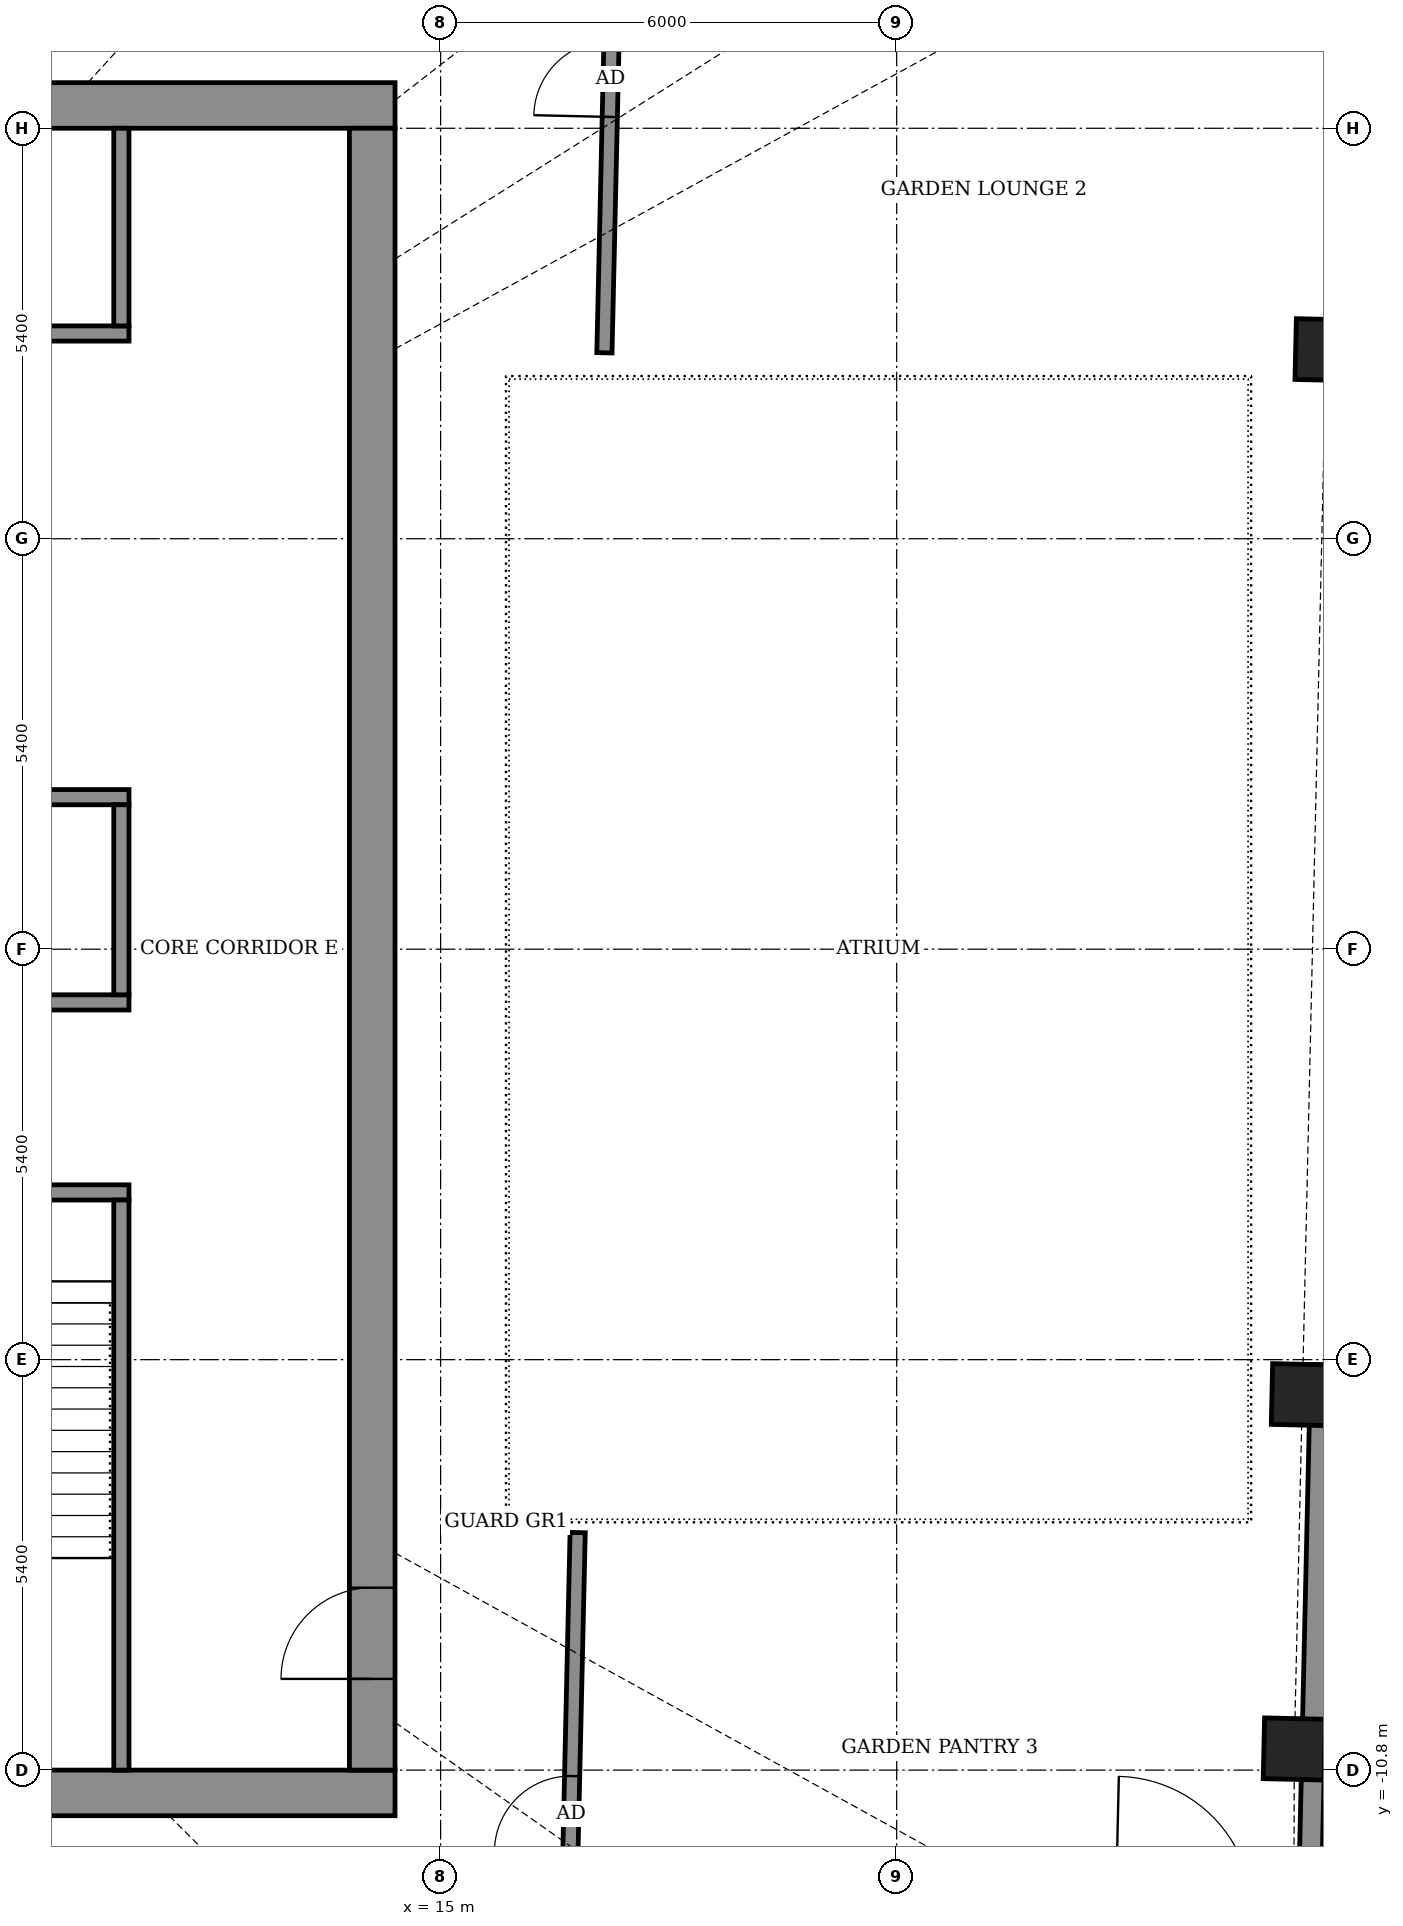
"""IFC4 building model, lengths in metres.
Left out: names, types, materials, properties, quantities, classifications, styles, units other than length and angle.
Written with IfcOpenShell. Run it as: python <this file> out.ifc"""

import sys

from ifc_helpers import new_model, si_unit, direction, frame, frame_2d, origin, origin_2d, place, context, subcontext, project, spatial, rectangle, extrude, element, fill, save


model = new_model("IFC4")
c1 = context("Model", 3, precision=1e-05, world=origin(), true_north=direction((0.0, 1.0)))
c2 = subcontext(c1, "Body", "Model", "MODEL_VIEW")
j1 = project(units=[si_unit("LENGTHUNIT", "METRE"), si_unit("PLANEANGLEUNIT", "RADIAN")], contexts=[c1])
p1 = place(None, origin())
s1 = spatial("IfcSite", under=j1, at=p1, CompositionType="ELEMENT")
p2 = place(p1, origin())
s2 = spatial("IfcBuilding", under=s1, at=p2, CompositionType="ELEMENT")
p3 = place(p2, frame((0.0, 0.0, 346.1)))
s3 = spatial("IfcBuildingStorey", under=s2, at=p3, CompositionType="ELEMENT", Elevation=346.1)
for number, where, z_axis, x_axis in (
    (1, (26.231, -10.522, -0.55), (0.0, 0.0, 1.0), (0.023, 1.0, 0.0)),
    (2, (26.337, -5.861, -0.55), (0.0, 0.0, 1.0), (0.023, 1.0, 0.0)),
    (3, (26.649, 7.886, -0.55), (0.0, 0.0, 1.0), (0.023, 1.0, 0.0)),
):
    element("IfcColumn", number, at=place(p3, frame(where, z_axis=z_axis, x_axis=x_axis)), inside=s3, PredefinedType="COLUMN", context=c2, shape_type="SweptSolid", body=[
        extrude(rectangle(XDim=0.8, YDim=0.8, at=origin_2d()), origin(), (0.0, 0.0, 1.0), 4.6),
    ])
p4 = place(p3, frame((26.431, -12.74, 0.0), z_axis=(0.0, 0.0, 1.0), x_axis=(0.022686338341, 0.999742631907, 0.0)))
e4 = element("IfcWall", 4, at=p4, inside=s3, PredefinedType="SOLIDWALL", context=c2, shape_type="SweptSolid", body=[
    extrude(rectangle(XDim=7.275, YDim=0.3, at=frame_2d((3.637, 0.0))), origin(), (0.0, 0.0, 1.0), 2.75),
])
p5 = place(p3, frame((16.684, -12.919, 0.0), z_axis=(0.0, 0.0, 1.0), x_axis=(0.022667483124, 0.999743059595, 0.0)))
e5 = element("IfcWall", 5, at=p5, inside=s3, PredefinedType="PARTITIONING", context=c2, shape_type="SweptSolid", body=[
    extrude(rectangle(XDim=5.245, YDim=0.2, at=frame_2d((2.623, 0.0))), origin(), (0.0, 0.0, 1.0), 2.65),
])
p6 = place(p5, frame((1.041, 0.0, 0.0)))
e6 = element("IfcOpeningElement", 6, at=p6, cuts=e5, PredefinedType="OPENING", context=c2, shape_type="SweptSolid", body=[
    extrude(rectangle(XDim=1.0, YDim=2.1, at=frame_2d((0.5, 1.05))), frame((0.0, 0.11, 0.0), z_axis=(0.0, -1.0, 0.0), x_axis=(1.0, 0.0, 0.0)), (0.0, 0.0, 1.0), 0.22),
])
p7 = place(p3, frame((17.155, 7.846, 0.0), z_axis=(0.0, 0.0, 1.0), x_axis=(0.022745886685, 0.999741278851, 0.0)))
e7 = element("IfcWall", 7, at=p7, inside=s3, PredefinedType="PARTITIONING", context=c2, shape_type="SweptSolid", body=[
    extrude(rectangle(XDim=4.304, YDim=0.2, at=frame_2d((2.152, 0.0))), origin(), (0.0, 0.0, 1.0), 2.55),
])
p8 = place(p7, frame((3.104, 0.0, 0.0)))
e8 = element("IfcOpeningElement", 8, at=p8, cuts=e7, PredefinedType="OPENING", context=c2, shape_type="SweptSolid", body=[
    extrude(rectangle(XDim=1.0, YDim=2.1, at=frame_2d((0.5, 1.05))), frame((0.0, 0.11, 0.0), z_axis=(0.0, -1.0, 0.0), x_axis=(1.0, 0.0, 0.0)), (0.0, 0.0, 1.0), 0.22),
])
for number, where, z_axis, x_axis in (
    (9, (-14.4, -11.1, 0.0), (0.0, 0.0, 1.0), (1.0, 0.0, 0.0)),
    (10, (-14.4, 11.1, 0.0), (0.0, 0.0, 1.0), (1.0, 0.0, 0.0)),
):
    element("IfcWall", number, at=place(p3, frame(where, z_axis=z_axis, x_axis=x_axis)), inside=s3, PredefinedType="SHEAR", context=c2, shape_type="SweptSolid", body=[
        extrude(rectangle(XDim=28.8, YDim=0.6, at=frame_2d((14.4, 0.0))), origin(), (0.0, 0.0, 1.0), 4.6),
    ])
p9 = place(p3, frame((14.1, -10.8, 0.0), z_axis=(0.0, 0.0, 1.0), x_axis=(0.0, 1.0, 0.0)))
e11 = element("IfcWall", 11, at=p9, inside=s3, PredefinedType="SHEAR", context=c2, shape_type="SweptSolid", body=[
    extrude(rectangle(XDim=21.6, YDim=0.6, at=frame_2d((10.8, 0.0))), origin(), (0.0, 0.0, 1.0), 4.6),
])
p10 = place(p9, frame((1.2, 0.0, 0.0)))
e12 = element("IfcOpeningElement", 12, at=p10, cuts=e11, PredefinedType="OPENING", context=c2, shape_type="SweptSolid", body=[
    extrude(rectangle(XDim=1.2, YDim=2.1, at=frame_2d((0.6, 1.05))), frame((0.0, 0.31, 0.0), z_axis=(0.0, -1.0, 0.0), x_axis=(1.0, 0.0, 0.0)), (0.0, 0.0, 1.0), 0.62),
])
p11 = place(p3, frame((-10.9, -3.2, 0.0), z_axis=(0.0, 0.0, 1.0), x_axis=(1.0, 0.0, 0.0)))
e13 = element("IfcWall", 13, at=p11, inside=s3, PredefinedType="SHEAR", context=c2, shape_type="SweptSolid", body=[
    extrude(rectangle(XDim=21.8, YDim=0.2, at=frame_2d((10.9, 0.0))), origin(), (0.0, 0.0, 1.0), 4.05),
])
p12 = place(p11, frame((1.075, 0.0, 0.0)))
e14 = element("IfcOpeningElement", 14, at=p12, cuts=e13, PredefinedType="OPENING", context=c2, shape_type="SweptSolid", body=[
    extrude(rectangle(XDim=1.1, YDim=2.1, at=frame_2d((0.55, 1.05))), frame((0.0, 0.11, 0.0), z_axis=(0.0, -1.0, 0.0), x_axis=(1.0, 0.0, 0.0)), (0.0, 0.0, 1.0), 0.22),
])
p13 = place(p11, frame((10.325, 0.0, 0.0)))
e15 = element("IfcOpeningElement", 15, at=p13, cuts=e13, PredefinedType="OPENING", context=c2, shape_type="SweptSolid", body=[
    extrude(rectangle(XDim=1.1, YDim=2.1, at=frame_2d((0.55, 1.05))), frame((0.0, 0.11, 0.0), z_axis=(0.0, -1.0, 0.0), x_axis=(1.0, 0.0, 0.0)), (0.0, 0.0, 1.0), 0.22),
])
p14 = place(p11, frame((19.625, 0.0, 0.0)))
e16 = element("IfcOpeningElement", 16, at=p14, cuts=e13, PredefinedType="OPENING", context=c2, shape_type="SweptSolid", body=[
    extrude(rectangle(XDim=1.1, YDim=2.1, at=frame_2d((0.55, 1.05))), frame((0.0, 0.11, 0.0), z_axis=(0.0, -1.0, 0.0), x_axis=(1.0, 0.0, 0.0)), (0.0, 0.0, 1.0), 0.22),
])
p15 = place(p11, frame((5.7, 0.0, 0.0)))
e17 = element("IfcOpeningElement", 17, at=p15, cuts=e13, PredefinedType="OPENING", context=c2, shape_type="SweptSolid", body=[
    extrude(rectangle(XDim=1.1, YDim=2.1, at=frame_2d((0.55, 1.05))), frame((0.0, 0.11, 0.0), z_axis=(0.0, -1.0, 0.0), x_axis=(1.0, 0.0, 0.0)), (0.0, 0.0, 1.0), 0.22),
])
p16 = place(p11, frame((14.975, 0.0, 0.0)))
e18 = element("IfcOpeningElement", 18, at=p16, cuts=e13, PredefinedType="OPENING", context=c2, shape_type="SweptSolid", body=[
    extrude(rectangle(XDim=1.1, YDim=2.1, at=frame_2d((0.55, 1.05))), frame((0.0, 0.11, 0.0), z_axis=(0.0, -1.0, 0.0), x_axis=(1.0, 0.0, 0.0)), (0.0, 0.0, 1.0), 0.22),
])
p17 = place(p3, frame((-10.9, -0.7, 0.0), z_axis=(0.0, 0.0, 1.0), x_axis=(1.0, 0.0, 0.0)))
e19 = element("IfcWall", 19, at=p17, inside=s3, PredefinedType="SHEAR", context=c2, shape_type="SweptSolid", body=[
    extrude(rectangle(XDim=21.8, YDim=0.2, at=frame_2d((10.9, 0.0))), origin(), (0.0, 0.0, 1.0), 4.05),
])
p18 = place(p3, frame((-10.9, 2.0, 0.0), z_axis=(0.0, 0.0, 1.0), x_axis=(1.0, 0.0, 0.0)))
e20 = element("IfcWall", 20, at=p18, inside=s3, PredefinedType="SHEAR", context=c2, shape_type="SweptSolid", body=[
    extrude(rectangle(XDim=21.8, YDim=0.2, at=frame_2d((10.9, 0.0))), origin(), (0.0, 0.0, 1.0), 4.05),
])
p19 = place(p18, frame((4.95, 0.0, 0.0)))
e21 = element("IfcOpeningElement", 21, at=p19, cuts=e20, PredefinedType="OPENING", context=c2, shape_type="SweptSolid", body=[
    extrude(rectangle(XDim=1.1, YDim=2.1, at=frame_2d((0.55, 1.05))), frame((0.0, 0.11, 0.0), z_axis=(0.0, -1.0, 0.0), x_axis=(1.0, 0.0, 0.0)), (0.0, 0.0, 1.0), 0.22),
])
p20 = place(p18, frame((7.65, 0.0, 0.0)))
e22 = element("IfcOpeningElement", 22, at=p20, cuts=e20, PredefinedType="OPENING", context=c2, shape_type="SweptSolid", body=[
    extrude(rectangle(XDim=1.1, YDim=2.1, at=frame_2d((0.55, 1.05))), frame((0.0, 0.11, 0.0), z_axis=(0.0, -1.0, 0.0), x_axis=(1.0, 0.0, 0.0)), (0.0, 0.0, 1.0), 0.22),
])
p21 = place(p18, frame((10.35, 0.0, 0.0)))
e23 = element("IfcOpeningElement", 23, at=p21, cuts=e20, PredefinedType="OPENING", context=c2, shape_type="SweptSolid", body=[
    extrude(rectangle(XDim=1.1, YDim=2.1, at=frame_2d((0.55, 1.05))), frame((0.0, 0.11, 0.0), z_axis=(0.0, -1.0, 0.0), x_axis=(1.0, 0.0, 0.0)), (0.0, 0.0, 1.0), 0.22),
])
p22 = place(p18, frame((1.675, 0.0, 0.0)))
e24 = element("IfcOpeningElement", 24, at=p22, cuts=e20, PredefinedType="OPENING", context=c2, shape_type="SweptSolid", body=[
    extrude(rectangle(XDim=0.9, YDim=2.1, at=frame_2d((0.45, 1.05))), frame((0.0, 0.11, 0.0), z_axis=(0.0, -1.0, 0.0), x_axis=(1.0, 0.0, 0.0)), (0.0, 0.0, 1.0), 0.22),
])
p23 = place(p18, frame((13.825, 0.0, 0.0)))
e25 = element("IfcOpeningElement", 25, at=p23, cuts=e20, PredefinedType="OPENING", context=c2, shape_type="SweptSolid", body=[
    extrude(rectangle(XDim=0.9, YDim=2.1, at=frame_2d((0.45, 1.05))), frame((0.0, 0.11, 0.0), z_axis=(0.0, -1.0, 0.0), x_axis=(1.0, 0.0, 0.0)), (0.0, 0.0, 1.0), 0.22),
])
p24 = place(p18, frame((18.55, 0.0, 0.0)))
e26 = element("IfcOpeningElement", 26, at=p24, cuts=e20, PredefinedType="OPENING", context=c2, shape_type="SweptSolid", body=[
    extrude(rectangle(XDim=0.9, YDim=2.1, at=frame_2d((0.45, 1.05))), frame((0.0, 0.11, 0.0), z_axis=(0.0, -1.0, 0.0), x_axis=(1.0, 0.0, 0.0)), (0.0, 0.0, 1.0), 0.22),
])
p25 = place(p3, frame((-10.9, 8.1, 0.0), z_axis=(0.0, 0.0, 1.0), x_axis=(1.0, 0.0, 0.0)))
e27 = element("IfcWall", 27, at=p25, inside=s3, PredefinedType="SHEAR", context=c2, shape_type="SweptSolid", body=[
    extrude(rectangle(XDim=21.8, YDim=0.2, at=frame_2d((10.9, 0.0))), origin(), (0.0, 0.0, 1.0), 4.05),
])
p26 = place(p25, frame((4.95, 0.0, 0.0)))
e28 = element("IfcOpeningElement", 28, at=p26, cuts=e27, PredefinedType="OPENING", context=c2, shape_type="SweptSolid", body=[
    extrude(rectangle(XDim=1.1, YDim=2.1, at=frame_2d((0.55, 1.05))), frame((0.0, 0.11, 0.0), z_axis=(0.0, -1.0, 0.0), x_axis=(1.0, 0.0, 0.0)), (0.0, 0.0, 1.0), 0.22),
])
p27 = place(p25, frame((7.65, 0.0, 0.0)))
e29 = element("IfcOpeningElement", 29, at=p27, cuts=e27, PredefinedType="OPENING", context=c2, shape_type="SweptSolid", body=[
    extrude(rectangle(XDim=1.1, YDim=2.1, at=frame_2d((0.55, 1.05))), frame((0.0, 0.11, 0.0), z_axis=(0.0, -1.0, 0.0), x_axis=(1.0, 0.0, 0.0)), (0.0, 0.0, 1.0), 0.22),
])
p28 = place(p25, frame((10.35, 0.0, 0.0)))
e30 = element("IfcOpeningElement", 30, at=p28, cuts=e27, PredefinedType="OPENING", context=c2, shape_type="SweptSolid", body=[
    extrude(rectangle(XDim=1.1, YDim=2.1, at=frame_2d((0.55, 1.05))), frame((0.0, 0.11, 0.0), z_axis=(0.0, -1.0, 0.0), x_axis=(1.0, 0.0, 0.0)), (0.0, 0.0, 1.0), 0.22),
])
p29 = place(p25, frame((1.675, 0.0, 0.0)))
e31 = element("IfcOpeningElement", 31, at=p29, cuts=e27, PredefinedType="OPENING", context=c2, shape_type="SweptSolid", body=[
    extrude(rectangle(XDim=0.9, YDim=2.1, at=frame_2d((0.45, 1.05))), frame((0.0, 0.11, 0.0), z_axis=(0.0, -1.0, 0.0), x_axis=(1.0, 0.0, 0.0)), (0.0, 0.0, 1.0), 0.22),
])
p30 = place(p25, frame((13.825, 0.0, 0.0)))
e32 = element("IfcOpeningElement", 32, at=p30, cuts=e27, PredefinedType="OPENING", context=c2, shape_type="SweptSolid", body=[
    extrude(rectangle(XDim=0.9, YDim=2.1, at=frame_2d((0.45, 1.05))), frame((0.0, 0.11, 0.0), z_axis=(0.0, -1.0, 0.0), x_axis=(1.0, 0.0, 0.0)), (0.0, 0.0, 1.0), 0.22),
])
p31 = place(p25, frame((18.55, 0.0, 0.0)))
e33 = element("IfcOpeningElement", 33, at=p31, cuts=e27, PredefinedType="OPENING", context=c2, shape_type="SweptSolid", body=[
    extrude(rectangle(XDim=0.9, YDim=2.1, at=frame_2d((0.45, 1.05))), frame((0.0, 0.11, 0.0), z_axis=(0.0, -1.0, 0.0), x_axis=(1.0, 0.0, 0.0)), (0.0, 0.0, 1.0), 0.22),
])
p32 = place(p3, frame((10.8, -10.8, 0.0), z_axis=(0.0, 0.0, 1.0), x_axis=(0.0, 1.0, 0.0)))
e34 = element("IfcWall", 34, at=p32, inside=s3, PredefinedType="SHEAR", context=c2, shape_type="SweptSolid", body=[
    extrude(rectangle(XDim=7.5, YDim=0.2, at=frame_2d((3.75, 0.0))), origin(), (0.0, 0.0, 1.0), 4.05),
])
p33 = place(p3, frame((10.8, -0.6, 0.0), z_axis=(0.0, 0.0, 1.0), x_axis=(0.0, 1.0, 0.0)))
e35 = element("IfcWall", 35, at=p33, inside=s3, PredefinedType="STANDARD", context=c2, shape_type="SweptSolid", body=[
    extrude(rectangle(XDim=2.5, YDim=0.2, at=frame_2d((1.25, 0.0))), origin(), (0.0, 0.0, 1.0), 4.05),
])
p34 = place(p3, frame((10.8, 8.2, 0.0), z_axis=(0.0, 0.0, 1.0), x_axis=(0.0, 1.0, 0.0)))
e36 = element("IfcWall", 36, at=p34, inside=s3, PredefinedType="STANDARD", context=c2, shape_type="SweptSolid", body=[
    extrude(rectangle(XDim=2.6, YDim=0.2, at=frame_2d((1.3, 0.0))), origin(), (0.0, 0.0, 1.0), 4.05),
])
p35 = place(p6, origin())
e37 = element("IfcDoor", 37, at=p35, inside=s3, OperationType="SINGLE_SWING_LEFT", PredefinedType="DOOR", context=c2, shape_type="SweptSolid", body=[
    extrude(rectangle(XDim=1.0, YDim=2.1, at=frame_2d((0.5, 1.05))), frame((0.0, 0.025, 0.0), z_axis=(0.0, -1.0, 0.0), x_axis=(1.0, 0.0, 0.0)), (0.0, 0.0, 1.0), 0.05),
])
fill(e6, e37)
p36 = place(p8, origin())
e38 = element("IfcDoor", 38, at=p36, inside=s3, OperationType="SINGLE_SWING_RIGHT", PredefinedType="DOOR", context=c2, shape_type="SweptSolid", body=[
    extrude(rectangle(XDim=1.0, YDim=2.1, at=frame_2d((0.5, 1.05))), frame((0.0, 0.025, 0.0), z_axis=(0.0, -1.0, 0.0), x_axis=(1.0, 0.0, 0.0)), (0.0, 0.0, 1.0), 0.05),
])
fill(e8, e38)
p37 = place(p10, origin())
e39 = element("IfcDoor", 39, at=p37, inside=s3, OperationType="DOUBLE_DOOR_SINGLE_SWING", PredefinedType="DOOR", context=c2, shape_type="SweptSolid", body=[
    extrude(rectangle(XDim=1.2, YDim=2.1, at=frame_2d((0.6, 1.05))), frame((0.0, 0.025, 0.0), z_axis=(0.0, -1.0, 0.0), x_axis=(1.0, 0.0, 0.0)), (0.0, 0.0, 1.0), 0.05),
])
fill(e12, e39)
save(model, sys.argv[1])
